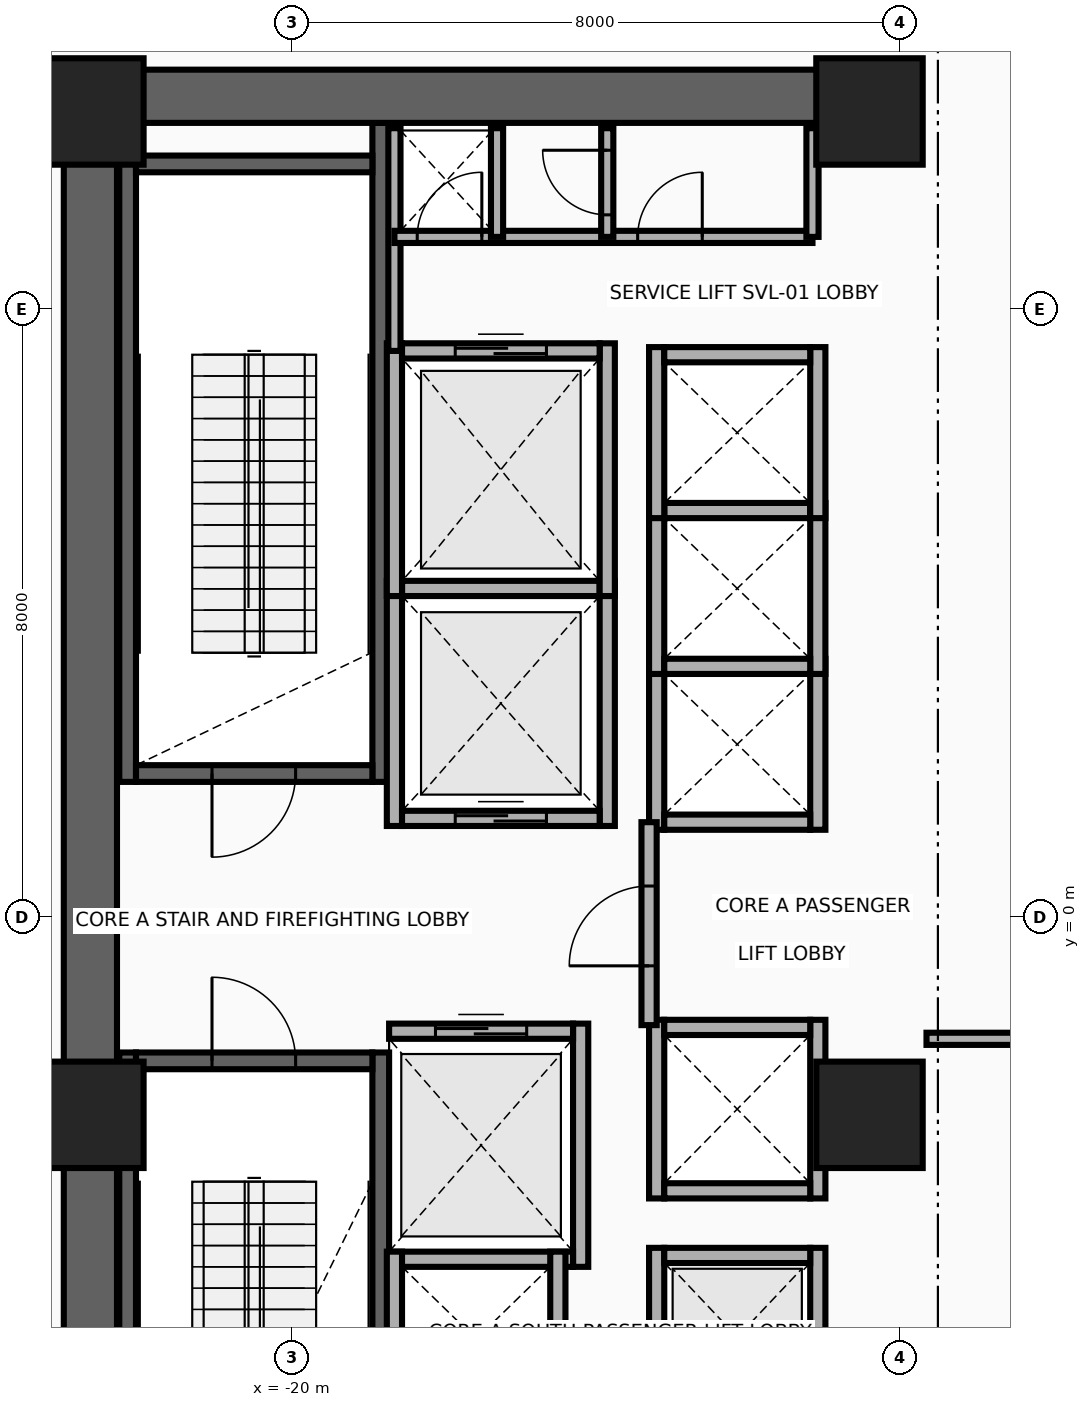
"""IFC4 building model, lengths in metres.
Left out: names, types, materials, properties, quantities, classifications, styles, units other than length and angle.
Written with IfcOpenShell. Run it as: python <this file> out.ifc"""

import sys

from ifc_helpers import new_model, si_unit, direction, frame, frame_2d, origin, origin_2d, place, context, subcontext, project, spatial, rectangle, extrude, source, transform, mapped, element, fill, save


model = new_model("IFC4")
c1 = context("Model", 3, precision=1e-05, world=origin(), true_north=direction((0.0, 1.0)))
c2 = subcontext(c1, "Body", "Model", "MODEL_VIEW")
j1 = project(units=[si_unit("LENGTHUNIT", "METRE"), si_unit("PLANEANGLEUNIT", "RADIAN")], contexts=[c1])
p1 = place(None, origin())
s1 = spatial("IfcSite", under=j1, at=p1, CompositionType="ELEMENT")
p2 = place(p1, origin())
s2 = spatial("IfcBuilding", under=s1, at=p2, CompositionType="ELEMENT")
p3 = place(p2, frame((0.0, 0.0, 10.4)))
s3 = spatial("IfcBuildingStorey", under=s2, at=p3, CompositionType="ELEMENT", Elevation=10.4)
for number, where, z_axis, x_axis in (
    (1, (-22.16, 1.78, 0.0), (0.0, 0.0, 1.0), (0.0, 1.0, 0.0)),
    (2, (-18.83, 1.78, 0.0), (0.0, 0.0, 1.0), (0.0, 1.0, 0.0)),
):
    element("IfcWall", number, at=place(p3, frame(where, z_axis=z_axis, x_axis=x_axis)), inside=s3, PredefinedType="SHEAR", context=c2, shape_type="SweptSolid", body=[
        extrude(rectangle(XDim=8.67, YDim=0.22, at=frame_2d((4.335, 0.0))), origin(), (0.0, 0.0, 1.0), 4.92),
    ])
p4 = place(p3, frame((-22.05, 1.89, 0.0), z_axis=(0.0, 0.0, 1.0), x_axis=(1.0, 0.0, 0.0)))
e3 = element("IfcWall", 3, at=p4, inside=s3, PredefinedType="SHEAR", context=c2, shape_type="SweptSolid", body=[
    extrude(rectangle(XDim=3.11, YDim=0.22, at=frame_2d((1.555, 0.0))), origin(), (0.0, 0.0, 1.0), 4.92),
])
p5 = place(p4, frame((1.0, 0.0, 0.0)))
e4 = element("IfcOpeningElement", 4, at=p5, cuts=e3, PredefinedType="OPENING", context=c2, shape_type="SweptSolid", body=[
    extrude(rectangle(XDim=1.1, YDim=2.15, at=frame_2d((0.55, 1.075))), frame((0.0, 0.125, 0.0), z_axis=(0.0, -1.0, 0.0), x_axis=(1.0, 0.0, 0.0)), (0.0, 0.0, 1.0), 0.25),
])
p6 = place(p3, frame((-22.05, 9.91, 0.0), z_axis=(0.0, 0.0, 1.0), x_axis=(1.0, 0.0, 0.0)))
e5 = element("IfcWall", 5, at=p6, inside=s3, PredefinedType="SHEAR", context=c2, shape_type="SweptSolid", body=[
    extrude(rectangle(XDim=3.11, YDim=0.22, at=frame_2d((1.555, 0.0))), origin(), (0.0, 0.0, 1.0), 4.92),
])
for number, where, z_axis, x_axis in (
    (6, (-22.16, -10.45, 0.0), (0.0, 0.0, 1.0), (0.0, 1.0, 0.0)),
    (7, (-18.83, -10.45, 0.0), (0.0, 0.0, 1.0), (0.0, 1.0, 0.0)),
):
    element("IfcWall", number, at=place(p3, frame(where, z_axis=z_axis, x_axis=x_axis)), inside=s3, PredefinedType="SHEAR", context=c2, shape_type="SweptSolid", body=[
        extrude(rectangle(XDim=8.67, YDim=0.22, at=frame_2d((4.335, 0.0))), origin(), (0.0, 0.0, 1.0), 4.92),
    ])
p7 = place(p3, frame((-22.05, -1.89, 0.0), z_axis=(0.0, 0.0, 1.0), x_axis=(1.0, 0.0, 0.0)))
e8 = element("IfcWall", 8, at=p7, inside=s3, PredefinedType="SHEAR", context=c2, shape_type="SweptSolid", body=[
    extrude(rectangle(XDim=3.11, YDim=0.22, at=frame_2d((1.555, 0.0))), origin(), (0.0, 0.0, 1.0), 4.92),
])
p8 = place(p7, frame((1.0, 0.0, 0.0)))
e9 = element("IfcOpeningElement", 9, at=p8, cuts=e8, PredefinedType="OPENING", context=c2, shape_type="SweptSolid", body=[
    extrude(rectangle(XDim=1.1, YDim=2.15, at=frame_2d((0.55, 1.075))), frame((0.0, 0.125, 0.0), z_axis=(0.0, -1.0, 0.0), x_axis=(1.0, 0.0, 0.0)), (0.0, 0.0, 1.0), 0.25),
])
p9 = place(p3, frame((-22.65, -11.15, 0.0), z_axis=(0.0, 0.0, 1.0), x_axis=(0.0, 1.0, 0.0)))
e10 = element("IfcWall", 10, at=p9, inside=s3, PredefinedType="SHEAR", context=c2, shape_type="SweptSolid", body=[
    extrude(rectangle(XDim=22.3, YDim=0.7, at=frame_2d((11.15, 0.0))), origin(), (0.0, 0.0, 1.0), 4.92),
])
p10 = place(p3, frame((-22.65, 10.8, 0.0), z_axis=(0.0, 0.0, 1.0), x_axis=(1.0, 0.0, 0.0)))
e11 = element("IfcWall", 11, at=p10, inside=s3, PredefinedType="SHEAR", context=c2, shape_type="SweptSolid", body=[
    extrude(rectangle(XDim=10.25, YDim=0.7, at=frame_2d((5.125, 0.0))), origin(), (0.0, 0.0, 1.0), 4.92),
])
m1 = source(origin(), c2, "Body", "SweptSolid", [
    extrude(rectangle(XDim=1.4, YDim=1.4, at=origin_2d()), origin(), (0.0, 0.0, 1.0), 5.2),
])
for number, where, z_axis, x_axis in (
    (12, (-22.65, -2.6, 0.0), (0.0, 0.0, 1.0), (1.0, 0.0, 0.0)),
    (13, (-12.4, -2.6, 0.0), (0.0, 0.0, 1.0), (1.0, 0.0, 0.0)),
    (14, (-22.65, 10.6, 0.0), (0.0, 0.0, 1.0), (1.0, 0.0, 0.0)),
    (15, (-12.4, 10.6, 0.0), (0.0, 0.0, 1.0), (1.0, 0.0, 0.0)),
):
    element("IfcColumn", number, at=place(p3, frame(where, z_axis=z_axis, x_axis=x_axis)), inside=s3, PredefinedType="COLUMN", context=c2, shape_type="MappedRepresentation", body=[
        mapped(m1, transform((0.0, 0.0, 0.0), x_axis=(1.0, 0.0, 0.0), y_axis=(0.0, 1.0, 0.0), z_axis=(0.0, 0.0, 1.0), scale=1.0)),
    ])
for number, where, z_axis, x_axis in (
    (16, (-18.65, 1.2, 0.0), (0.0, 0.0, 1.0), (0.0, 1.0, 0.0)),
    (17, (-15.85, 1.2, 0.0), (0.0, 0.0, 1.0), (0.0, 1.0, 0.0)),
):
    element("IfcWall", number, at=place(p3, frame(where, z_axis=z_axis, x_axis=x_axis)), inside=s3, PredefinedType="MOVABLE", context=c2, shape_type="SweptSolid", body=[
        extrude(rectangle(XDim=3.225, YDim=0.2, at=frame_2d((1.613, 0.0))), origin(), (0.0, 0.0, 1.0), 4.92),
    ])
p11 = place(p3, frame((-18.55, 1.3, 0.0), z_axis=(0.0, 0.0, 1.0), x_axis=(1.0, 0.0, 0.0)))
e18 = element("IfcWall", 18, at=p11, inside=s3, PredefinedType="MOVABLE", context=c2, shape_type="SweptSolid", body=[
    extrude(rectangle(XDim=2.6, YDim=0.2, at=frame_2d((1.3, 0.0))), origin(), (0.0, 0.0, 1.0), 4.92),
])
p12 = place(p11, frame((0.7, 0.0, 0.0)))
e19 = element("IfcOpeningElement", 19, at=p12, cuts=e18, PredefinedType="OPENING", context=c2, shape_type="SweptSolid", body=[
    extrude(rectangle(XDim=1.2, YDim=2.1, at=frame_2d((0.6, 1.05))), frame((0.0, 0.115, 0.0), z_axis=(0.0, -1.0, 0.0), x_axis=(1.0, 0.0, 0.0)), (0.0, 0.0, 1.0), 0.23),
])
p13 = place(p3, frame((-18.55, 4.325, 0.0), z_axis=(0.0, 0.0, 1.0), x_axis=(1.0, 0.0, 0.0)))
e20 = element("IfcWall", 20, at=p13, inside=s3, PredefinedType="MOVABLE", context=c2, shape_type="SweptSolid", body=[
    extrude(rectangle(XDim=2.6, YDim=0.2, at=frame_2d((1.3, 0.0))), origin(), (0.0, 0.0, 1.0), 4.92),
])
p14 = place(p3, frame((-16.2, -4.6, 0.0), z_axis=(0.0, 0.0, 1.0), x_axis=(0.0, 1.0, 0.0)))
e21 = element("IfcWall", 21, at=p14, inside=s3, PredefinedType="MOVABLE", context=c2, shape_type="SweptSolid", body=[
    extrude(rectangle(XDim=3.2, YDim=0.2, at=frame_2d((1.6, 0.0))), origin(), (0.0, 0.0, 1.0), 4.92),
])
p15 = place(p3, frame((-18.72, -4.5, 0.0), z_axis=(0.0, 0.0, 1.0), x_axis=(1.0, 0.0, 0.0)))
e22 = element("IfcWall", 22, at=p15, inside=s3, PredefinedType="MOVABLE", context=c2, shape_type="SweptSolid", body=[
    extrude(rectangle(XDim=2.42, YDim=0.2, at=frame_2d((1.21, 0.0))), origin(), (0.0, 0.0, 1.0), 4.92),
])
p16 = place(p3, frame((-18.72, -1.5, 0.0), z_axis=(0.0, 0.0, 1.0), x_axis=(1.0, 0.0, 0.0)))
e23 = element("IfcWall", 23, at=p16, inside=s3, PredefinedType="MOVABLE", context=c2, shape_type="SweptSolid", body=[
    extrude(rectangle(XDim=2.42, YDim=0.2, at=frame_2d((1.21, 0.0))), origin(), (0.0, 0.0, 1.0), 4.92),
])
p17 = place(p16, frame((0.61, 0.0, 0.0)))
e24 = element("IfcOpeningElement", 24, at=p17, cuts=e23, PredefinedType="OPENING", context=c2, shape_type="SweptSolid", body=[
    extrude(rectangle(XDim=1.2, YDim=2.1, at=frame_2d((0.6, 1.05))), frame((0.0, 0.115, 0.0), z_axis=(0.0, -1.0, 0.0), x_axis=(1.0, 0.0, 0.0)), (0.0, 0.0, 1.0), 0.23),
])
for number, where, z_axis, x_axis in (
    (25, (-18.65, 4.225, 0.0), (0.0, 0.0, 1.0), (0.0, 1.0, 0.0)),
    (26, (-15.85, 4.225, 0.0), (0.0, 0.0, 1.0), (0.0, 1.0, 0.0)),
):
    element("IfcWall", number, at=place(p3, frame(where, z_axis=z_axis, x_axis=x_axis)), inside=s3, PredefinedType="MOVABLE", context=c2, shape_type="SweptSolid", body=[
        extrude(rectangle(XDim=3.325, YDim=0.2, at=frame_2d((1.663, 0.0))), origin(), (0.0, 0.0, 1.0), 4.92),
    ])
p18 = place(p3, frame((-18.55, 7.45, 0.0), z_axis=(0.0, 0.0, 1.0), x_axis=(1.0, 0.0, 0.0)))
e27 = element("IfcWall", 27, at=p18, inside=s3, PredefinedType="MOVABLE", context=c2, shape_type="SweptSolid", body=[
    extrude(rectangle(XDim=2.6, YDim=0.2, at=frame_2d((1.3, 0.0))), origin(), (0.0, 0.0, 1.0), 4.92),
])
p19 = place(p18, frame((0.7, 0.0, 0.0)))
e28 = element("IfcOpeningElement", 28, at=p19, cuts=e27, PredefinedType="OPENING", context=c2, shape_type="SweptSolid", body=[
    extrude(rectangle(XDim=1.2, YDim=2.1, at=frame_2d((0.6, 1.05))), frame((0.0, 0.115, 0.0), z_axis=(0.0, -1.0, 0.0), x_axis=(1.0, 0.0, 0.0)), (0.0, 0.0, 1.0), 0.23),
])
for number, where, z_axis, x_axis in (
    (29, (-15.2, -6.7, 0.0), (0.0, 0.0, 1.0), (0.0, 1.0, 0.0)),
    (30, (-13.08, -6.7, 0.0), (0.0, 0.0, 1.0), (0.0, 1.0, 0.0)),
):
    element("IfcWall", number, at=place(p3, frame(where, z_axis=z_axis, x_axis=x_axis)), inside=s3, PredefinedType="MOVABLE", context=c2, shape_type="SweptSolid", body=[
        extrude(rectangle(XDim=2.35, YDim=0.2, at=frame_2d((1.175, 0.0))), origin(), (0.0, 0.0, 1.0), 4.92),
    ])
p20 = place(p3, frame((-15.1, -4.45, 0.0), z_axis=(0.0, 0.0, 1.0), x_axis=(1.0, 0.0, 0.0)))
e31 = element("IfcWall", 31, at=p20, inside=s3, PredefinedType="MOVABLE", context=c2, shape_type="SweptSolid", body=[
    extrude(rectangle(XDim=1.92, YDim=0.2, at=frame_2d((0.96, 0.0))), origin(), (0.0, 0.0, 1.0), 4.92),
])
for number, where, z_axis, x_axis in (
    (32, (-15.2, 1.15, 0.0), (0.0, 0.0, 1.0), (0.0, 1.0, 0.0)),
    (33, (-13.08, 1.15, 0.0), (0.0, 0.0, 1.0), (0.0, 1.0, 0.0)),
):
    element("IfcWall", number, at=place(p3, frame(where, z_axis=z_axis, x_axis=x_axis)), inside=s3, PredefinedType="MOVABLE", context=c2, shape_type="SweptSolid", body=[
        extrude(rectangle(XDim=2.25, YDim=0.2, at=frame_2d((1.125, 0.0))), origin(), (0.0, 0.0, 1.0), 4.92),
    ])
p21 = place(p3, frame((-15.1, 1.25, 0.0), z_axis=(0.0, 0.0, 1.0), x_axis=(1.0, 0.0, 0.0)))
e34 = element("IfcWall", 34, at=p21, inside=s3, PredefinedType="MOVABLE", context=c2, shape_type="SweptSolid", body=[
    extrude(rectangle(XDim=1.92, YDim=0.2, at=frame_2d((0.96, 0.0))), origin(), (0.0, 0.0, 1.0), 4.92),
])
for number, where, z_axis, x_axis in (
    (35, (-15.2, 3.2, 0.0), (0.0, 0.0, 1.0), (0.0, 1.0, 0.0)),
    (36, (-13.08, 3.2, 0.0), (0.0, 0.0, 1.0), (0.0, 1.0, 0.0)),
):
    element("IfcWall", number, at=place(p3, frame(where, z_axis=z_axis, x_axis=x_axis)), inside=s3, PredefinedType="MOVABLE", context=c2, shape_type="SweptSolid", body=[
        extrude(rectangle(XDim=2.25, YDim=0.2, at=frame_2d((1.125, 0.0))), origin(), (0.0, 0.0, 1.0), 4.92),
    ])
for number, where, z_axis, x_axis in (
    (37, (-15.1, 3.3, 0.0), (0.0, 0.0, 1.0), (1.0, 0.0, 0.0)),
    (38, (-15.1, 5.35, 0.0), (0.0, 0.0, 1.0), (1.0, 0.0, 0.0)),
):
    element("IfcWall", number, at=place(p3, frame(where, z_axis=z_axis, x_axis=x_axis)), inside=s3, PredefinedType="MOVABLE", context=c2, shape_type="SweptSolid", body=[
        extrude(rectangle(XDim=1.92, YDim=0.2, at=frame_2d((0.96, 0.0))), origin(), (0.0, 0.0, 1.0), 4.92),
    ])
for number, where, z_axis, x_axis in (
    (39, (-15.2, 5.25, 0.0), (0.0, 0.0, 1.0), (0.0, 1.0, 0.0)),
    (40, (-13.08, 5.25, 0.0), (0.0, 0.0, 1.0), (0.0, 1.0, 0.0)),
):
    element("IfcWall", number, at=place(p3, frame(where, z_axis=z_axis, x_axis=x_axis)), inside=s3, PredefinedType="MOVABLE", context=c2, shape_type="SweptSolid", body=[
        extrude(rectangle(XDim=2.25, YDim=0.2, at=frame_2d((1.125, 0.0))), origin(), (0.0, 0.0, 1.0), 4.92),
    ])
p22 = place(p3, frame((-15.1, 7.4, 0.0), z_axis=(0.0, 0.0, 1.0), x_axis=(1.0, 0.0, 0.0)))
e41 = element("IfcWall", 41, at=p22, inside=s3, PredefinedType="MOVABLE", context=c2, shape_type="SweptSolid", body=[
    extrude(rectangle(XDim=1.92, YDim=0.2, at=frame_2d((0.96, 0.0))), origin(), (0.0, 0.0, 1.0), 4.92),
])
for number, where, z_axis, x_axis in (
    (42, (-18.65, -6.7, 0.0), (0.0, 0.0, 1.0), (0.0, 1.0, 0.0)),
    (43, (-16.5, -6.7, 0.0), (0.0, 0.0, 1.0), (0.0, 1.0, 0.0)),
):
    element("IfcWall", number, at=place(p3, frame(where, z_axis=z_axis, x_axis=x_axis)), inside=s3, PredefinedType="MOVABLE", context=c2, shape_type="SweptSolid", body=[
        extrude(rectangle(XDim=2.3, YDim=0.2, at=frame_2d((1.15, 0.0))), origin(), (0.0, 0.0, 1.0), 4.92),
    ])
for number, where, z_axis, x_axis in (
    (44, (-15.2, -3.7, 0.0), (0.0, 0.0, 1.0), (0.0, 1.0, 0.0)),
    (45, (-13.08, -3.7, 0.0), (0.0, 0.0, 1.0), (0.0, 1.0, 0.0)),
):
    element("IfcWall", number, at=place(p3, frame(where, z_axis=z_axis, x_axis=x_axis)), inside=s3, PredefinedType="MOVABLE", context=c2, shape_type="SweptSolid", body=[
        extrude(rectangle(XDim=2.35, YDim=0.2, at=frame_2d((1.175, 0.0))), origin(), (0.0, 0.0, 1.0), 4.92),
    ])
for number, where, z_axis, x_axis in (
    (46, (-15.1, -3.6, 0.0), (0.0, 0.0, 1.0), (1.0, 0.0, 0.0)),
    (47, (-15.1, -1.45, 0.0), (0.0, 0.0, 1.0), (1.0, 0.0, 0.0)),
):
    element("IfcWall", number, at=place(p3, frame(where, z_axis=z_axis, x_axis=x_axis)), inside=s3, PredefinedType="MOVABLE", context=c2, shape_type="SweptSolid", body=[
        extrude(rectangle(XDim=1.92, YDim=0.2, at=frame_2d((0.96, 0.0))), origin(), (0.0, 0.0, 1.0), 4.92),
    ])
p23 = place(p3, frame((-15.3, -1.42, 0.0), z_axis=(0.0, 0.0, 1.0), x_axis=(0.0, 1.0, 0.0)))
e48 = element("IfcWall", 48, at=p23, inside=s3, PredefinedType="PARTITIONING", context=c2, shape_type="SweptSolid", body=[
    extrude(rectangle(XDim=2.67, YDim=0.2, at=frame_2d((1.335, 0.0))), origin(), (0.0, 0.0, 1.0), 4.92),
])
p24 = place(p23, frame((0.78, 0.0, 0.0)))
e49 = element("IfcOpeningElement", 49, at=p24, cuts=e48, PredefinedType="OPENING", context=c2, shape_type="SweptSolid", body=[
    extrude(rectangle(XDim=1.05, YDim=2.15, at=frame_2d((0.525, 1.075))), frame((0.0, 0.115, 0.0), z_axis=(0.0, -1.0, 0.0), x_axis=(1.0, 0.0, 0.0)), (0.0, 0.0, 1.0), 0.23),
])
p25 = place(p3, frame((-18.65, 7.45, 0.0), z_axis=(0.0, 0.0, 1.0), x_axis=(0.0, 1.0, 0.0)))
e50 = element("IfcWall", 50, at=p25, inside=s3, PredefinedType="PARTITIONING", context=c2, shape_type="SweptSolid", body=[
    extrude(rectangle(XDim=2.93, YDim=0.16, at=frame_2d((1.465, 0.0))), origin(), (0.0, 0.0, 1.0), 3.957),
])
p26 = place(p3, frame((-18.65, 8.95, 0.0), z_axis=(0.0, 0.0, 1.0), x_axis=(1.0, 0.0, 0.0)))
e51 = element("IfcWall", 51, at=p26, inside=s3, PredefinedType="PARTITIONING", context=c2, shape_type="SweptSolid", body=[
    extrude(rectangle(XDim=5.5, YDim=0.16, at=frame_2d((2.75, 0.0))), origin(), (0.0, 0.0, 1.0), 4.92),
])
p27 = place(p26, frame((0.3, 0.0, 0.0)))
e52 = element("IfcOpeningElement", 52, at=p27, cuts=e51, PredefinedType="OPENING", context=c2, shape_type="SweptSolid", body=[
    extrude(rectangle(XDim=0.85, YDim=2.05, at=frame_2d((0.425, 1.025))), frame((0.0, 0.095, 0.0), z_axis=(0.0, -1.0, 0.0), x_axis=(1.0, 0.0, 0.0)), (0.0, 0.0, 1.0), 0.19),
])
p28 = place(p26, frame((3.2, 0.0, 0.0)))
e53 = element("IfcOpeningElement", 53, at=p28, cuts=e51, PredefinedType="OPENING", context=c2, shape_type="SweptSolid", body=[
    extrude(rectangle(XDim=0.85, YDim=2.05, at=frame_2d((0.425, 1.025))), frame((0.0, 0.095, 0.0), z_axis=(0.0, -1.0, 0.0), x_axis=(1.0, 0.0, 0.0)), (0.0, 0.0, 1.0), 0.19),
])
for number, where, z_axis, x_axis in (
    (54, (-13.15, 8.95, 0.0), (0.0, 0.0, 1.0), (0.0, 1.0, 0.0)),
    (55, (-17.3, 8.95, 0.0), (0.0, 0.0, 1.0), (0.0, 1.0, 0.0)),
):
    element("IfcWall", number, at=place(p3, frame(where, z_axis=z_axis, x_axis=x_axis)), inside=s3, PredefinedType="PARTITIONING", context=c2, shape_type="SweptSolid", body=[
        extrude(rectangle(XDim=1.43, YDim=0.16, at=frame_2d((0.715, 0.0))), origin(), (0.0, 0.0, 1.0), 3.957),
    ])
p29 = place(p3, frame((-15.85, 8.95, 0.0), z_axis=(0.0, 0.0, 1.0), x_axis=(0.0, 1.0, 0.0)))
e56 = element("IfcWall", 56, at=p29, inside=s3, PredefinedType="PARTITIONING", context=c2, shape_type="SweptSolid", body=[
    extrude(rectangle(XDim=1.43, YDim=0.16, at=frame_2d((0.715, 0.0))), origin(), (0.0, 0.0, 1.0), 3.957),
])
p30 = place(p29, frame((0.29, 0.0, 0.0)))
e57 = element("IfcOpeningElement", 57, at=p30, cuts=e56, PredefinedType="OPENING", context=c2, shape_type="SweptSolid", body=[
    extrude(rectangle(XDim=0.85, YDim=2.05, at=frame_2d((0.425, 1.025))), frame((0.0, 0.095, 0.0), z_axis=(0.0, -1.0, 0.0), x_axis=(1.0, 0.0, 0.0)), (0.0, 0.0, 1.0), 0.19),
])
p31 = place(p3, frame((-11.65, -1.6, 0.0), z_axis=(0.0, 0.0, 1.0), x_axis=(1.0, 0.0, 0.0)))
e58 = element("IfcWall", 58, at=p31, inside=s3, PredefinedType="PARTITIONING", context=c2, shape_type="SweptSolid", body=[
    extrude(rectangle(XDim=1.85, YDim=0.16, at=frame_2d((0.925, 0.0))), origin(), (0.0, 0.0, 1.0), 4.92),
])
p32 = place(p12, origin())
e59 = element("IfcDoor", 59, at=p32, inside=s3, OperationType="DOUBLE_DOOR_SLIDING", PredefinedType="DOOR", context=c2, shape_type="SweptSolid", body=[
    extrude(rectangle(XDim=1.2, YDim=2.1, at=frame_2d((0.6, 1.05))), frame((0.0, 0.025, 0.0), z_axis=(0.0, -1.0, 0.0), x_axis=(1.0, 0.0, 0.0)), (0.0, 0.0, 1.0), 0.05),
])
fill(e19, e59)
p33 = place(p17, origin())
e60 = element("IfcDoor", 60, at=p33, inside=s3, OperationType="DOUBLE_DOOR_SLIDING", PredefinedType="DOOR", context=c2, shape_type="SweptSolid", body=[
    extrude(rectangle(XDim=1.2, YDim=2.1, at=frame_2d((0.6, 1.05))), frame((0.0, 0.025, 0.0), z_axis=(0.0, -1.0, 0.0), x_axis=(1.0, 0.0, 0.0)), (0.0, 0.0, 1.0), 0.05),
])
fill(e24, e60)
p34 = place(p19, origin())
e61 = element("IfcDoor", 61, at=p34, inside=s3, OperationType="DOUBLE_DOOR_SLIDING", PredefinedType="DOOR", context=c2, shape_type="SweptSolid", body=[
    extrude(rectangle(XDim=1.2, YDim=2.1, at=frame_2d((0.6, 1.05))), frame((0.0, 0.025, 0.0), z_axis=(0.0, -1.0, 0.0), x_axis=(1.0, 0.0, 0.0)), (0.0, 0.0, 1.0), 0.05),
])
fill(e28, e61)
p35 = place(p24, origin())
e62 = element("IfcDoor", 62, at=p35, inside=s3, OperationType="SINGLE_SWING_RIGHT", PredefinedType="DOOR", context=c2, shape_type="SweptSolid", body=[
    extrude(rectangle(XDim=1.05, YDim=2.15, at=frame_2d((0.525, 1.075))), frame((0.0, 0.025, 0.0), z_axis=(0.0, -1.0, 0.0), x_axis=(1.0, 0.0, 0.0)), (0.0, 0.0, 1.0), 0.05),
])
fill(e49, e62)
p36 = place(p5, frame((1.1, 0.0, 0.0), z_axis=(0.0, 0.0, 1.0), x_axis=(-1.0, 0.0, 0.0)))
e63 = element("IfcDoor", 63, at=p36, inside=s3, OperationType="SINGLE_SWING_LEFT", PredefinedType="DOOR", context=c2, shape_type="SweptSolid", body=[
    extrude(rectangle(XDim=1.1, YDim=2.15, at=frame_2d((0.55, 1.075))), frame((0.0, 0.025, 0.0), z_axis=(0.0, -1.0, 0.0), x_axis=(1.0, 0.0, 0.0)), (0.0, 0.0, 1.0), 0.05),
])
fill(e4, e63)
p37 = place(p8, origin())
e64 = element("IfcDoor", 64, at=p37, inside=s3, OperationType="SINGLE_SWING_RIGHT", PredefinedType="DOOR", context=c2, shape_type="SweptSolid", body=[
    extrude(rectangle(XDim=1.1, YDim=2.15, at=frame_2d((0.55, 1.075))), frame((0.0, 0.025, 0.0), z_axis=(0.0, -1.0, 0.0), x_axis=(1.0, 0.0, 0.0)), (0.0, 0.0, 1.0), 0.05),
])
fill(e9, e64)
p38 = place(p27, origin())
e65 = element("IfcDoor", 65, at=p38, inside=s3, OperationType="SINGLE_SWING_LEFT", PredefinedType="DOOR", context=c2, shape_type="SweptSolid", body=[
    extrude(rectangle(XDim=0.85, YDim=2.05, at=frame_2d((0.425, 1.025))), frame((0.0, 0.025, 0.0), z_axis=(0.0, -1.0, 0.0), x_axis=(1.0, 0.0, 0.0)), (0.0, 0.0, 1.0), 0.05),
])
fill(e52, e65)
p39 = place(p28, origin())
e66 = element("IfcDoor", 66, at=p39, inside=s3, OperationType="SINGLE_SWING_RIGHT", PredefinedType="DOOR", context=c2, shape_type="SweptSolid", body=[
    extrude(rectangle(XDim=0.85, YDim=2.05, at=frame_2d((0.425, 1.025))), frame((0.0, 0.025, 0.0), z_axis=(0.0, -1.0, 0.0), x_axis=(1.0, 0.0, 0.0)), (0.0, 0.0, 1.0), 0.05),
])
fill(e53, e66)
p40 = place(p30, origin())
e67 = element("IfcDoor", 67, at=p40, inside=s3, OperationType="SINGLE_SWING_LEFT", PredefinedType="DOOR", context=c2, shape_type="SweptSolid", body=[
    extrude(rectangle(XDim=0.85, YDim=2.05, at=frame_2d((0.425, 1.025))), frame((0.0, 0.025, 0.0), z_axis=(0.0, -1.0, 0.0), x_axis=(1.0, 0.0, 0.0)), (0.0, 0.0, 1.0), 0.05),
])
fill(e57, e67)
save(model, sys.argv[1])
